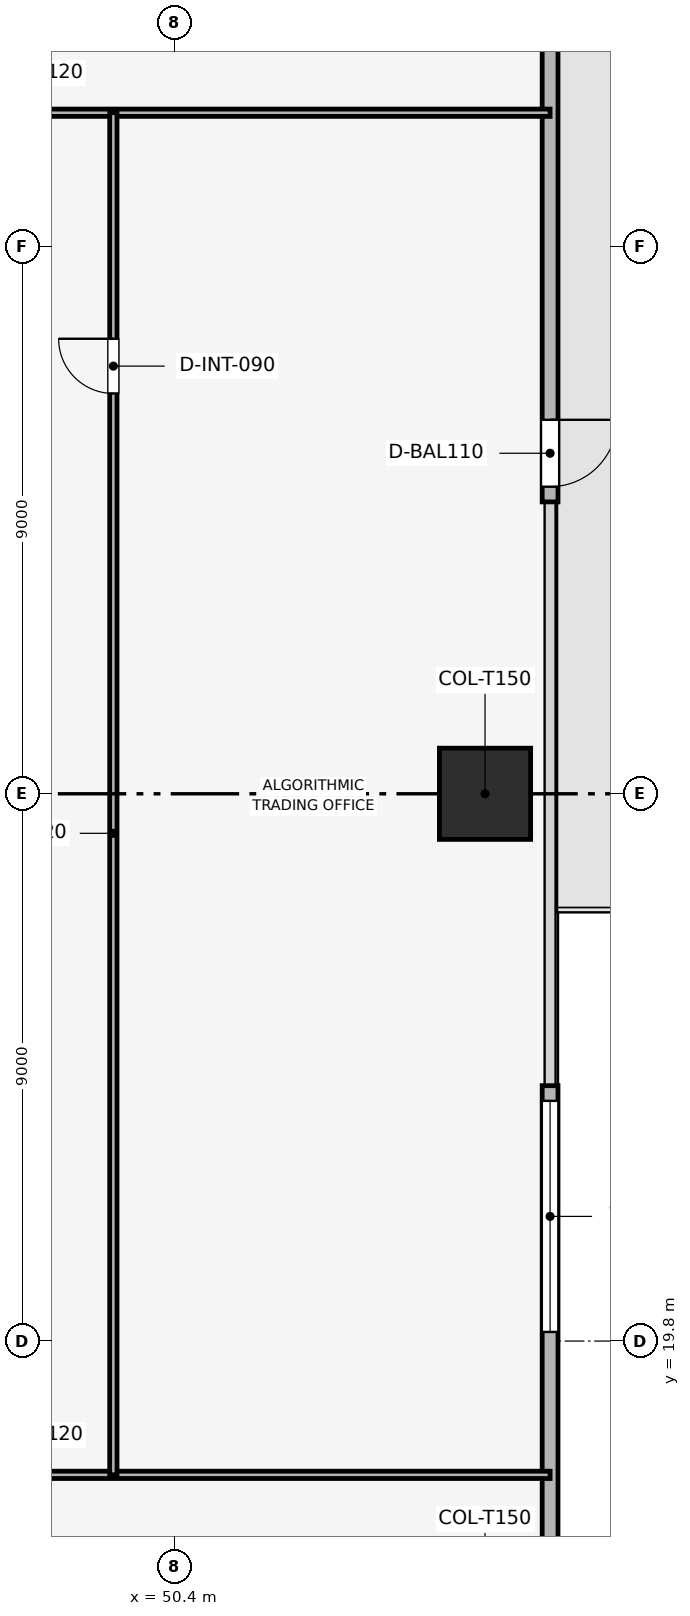
"""IFC4 building model, lengths in metres.
Left out: names, types, materials, properties, quantities, classifications, styles, units other than length and angle.
Written with IfcOpenShell. Run it as: python <this file> out.ifc"""

import sys

from ifc_helpers import new_model, si_unit, direction, frame, frame_2d, origin, origin_2d, place, context, subcontext, project, spatial, rectangle, extrude, element, fill, save


model = new_model("IFC4")
c1 = context("Model", 3, precision=1e-05, world=origin(), true_north=direction((0.0, 1.0)))
c2 = subcontext(c1, "Body", "Model", "MODEL_VIEW")
j1 = project(units=[si_unit("LENGTHUNIT", "METRE"), si_unit("PLANEANGLEUNIT", "RADIAN")], contexts=[c1])
p1 = place(None, origin())
s1 = spatial("IfcSite", under=j1, at=p1, CompositionType="ELEMENT")
p2 = place(p1, origin())
s2 = spatial("IfcBuilding", under=s1, at=p2, CompositionType="ELEMENT")
p3 = place(p2, frame((0.0, 0.0, 80.7)))
s3 = spatial("IfcBuildingStorey", under=s2, at=p3, CompositionType="ELEMENT", Elevation=80.7)
p4 = place(p3, frame((55.5, 28.8, 0.003), z_axis=(0.0, 0.0, 1.0), x_axis=(1.0, 0.0, 0.0)))
e1 = element("IfcColumn", 1, at=p4, inside=s3, PredefinedType="COLUMN", context=c2, shape_type="SweptSolid", body=[
    extrude(rectangle(XDim=1.5, YDim=1.5, at=origin_2d()), origin(), (0.0, 0.0, 1.0), 3.644),
])
p5 = place(p3, frame((56.57, 48.9, 0.0), z_axis=(0.0, 0.0, 1.0), x_axis=(0.0, -1.0, 0.0)))
e2 = element("IfcWall", 2, at=p5, inside=s3, PredefinedType="SOLIDWALL", context=c2, shape_type="SweptSolid", body=[
    extrude(rectangle(XDim=15.3, YDim=0.26, at=frame_2d((7.65, 0.0))), origin(), (0.0, 0.0, 1.0), 3.65),
])
p6 = place(p5, frame((13.95, 0.0, 0.0)))
e3 = element("IfcOpeningElement", 3, at=p6, cuts=e2, PredefinedType="OPENING", context=c2, shape_type="SweptSolid", body=[
    extrude(rectangle(XDim=1.1, YDim=2.2, at=frame_2d((0.55, 1.1))), frame((0.0, 0.14, 0.0), z_axis=(0.0, -1.0, 0.0), x_axis=(1.0, 0.0, 0.0)), (0.0, 0.0, 1.0), 0.28),
])
p7 = place(p3, frame((56.57, 24.0, 0.0), z_axis=(0.0, 0.0, 1.0), x_axis=(0.0, -1.0, 0.0)))
e4 = element("IfcWall", 4, at=p7, inside=s3, PredefinedType="SOLIDWALL", context=c2, shape_type="SweptSolid", body=[
    extrude(rectangle(XDim=15.3, YDim=0.26, at=frame_2d((7.65, 0.0))), origin(), (0.0, 0.0, 1.0), 3.65),
])
p8 = place(p7, frame((0.25, 0.0, 0.9)))
e5 = element("IfcOpeningElement", 5, at=p8, cuts=e4, PredefinedType="OPENING", context=c2, shape_type="SweptSolid", body=[
    extrude(rectangle(XDim=3.8, YDim=1.9, at=frame_2d((1.9, 0.95))), frame((0.0, 0.14, 0.0), z_axis=(0.0, -1.0, 0.0), x_axis=(1.0, 0.0, 0.0)), (0.0, 0.0, 1.0), 0.28),
])
for number, where, z_axis, x_axis in (
    (6, (40.0, 17.6, 0.0), (0.0, 0.0, 1.0), (1.0, 0.0, 0.0)),
    (7, (40.0, 40.0, 0.0), (0.0, 0.0, 1.0), (1.0, 0.0, 0.0)),
):
    element("IfcWall", number, at=place(p3, frame(where, z_axis=z_axis, x_axis=x_axis)), inside=s3, PredefinedType="PARTITIONING", context=c2, shape_type="SweptSolid", body=[
        extrude(rectangle(XDim=16.57, YDim=0.12, at=frame_2d((8.285, 0.0))), origin(), (0.0, 0.0, 1.0), 2.935),
    ])
p9 = place(p3, frame((49.388, 17.6, 0.0), z_axis=(0.0, 0.0, 1.0), x_axis=(0.0, 1.0, 0.0)))
e8 = element("IfcWall", 8, at=p9, inside=s3, PredefinedType="PARTITIONING", context=c2, shape_type="SweptSolid", body=[
    extrude(rectangle(XDim=22.4, YDim=0.12, at=frame_2d((11.2, 0.0))), origin(), (0.0, 0.0, 1.0), 3.085),
])
p10 = place(p9, frame((17.783, 0.0, 0.0)))
e9 = element("IfcOpeningElement", 9, at=p10, cuts=e8, PredefinedType="OPENING", context=c2, shape_type="SweptSolid", body=[
    extrude(rectangle(XDim=0.9, YDim=2.1, at=frame_2d((0.45, 1.05))), frame((0.0, 0.07, 0.0), z_axis=(0.0, -1.0, 0.0), x_axis=(1.0, 0.0, 0.0)), (0.0, 0.0, 1.0), 0.14),
])
p11 = place(p6, origin())
e10 = element("IfcDoor", 10, at=p11, inside=s3, OperationType="SINGLE_SWING_LEFT", PredefinedType="DOOR", context=c2, shape_type="SweptSolid", body=[
    extrude(rectangle(XDim=1.1, YDim=2.2, at=frame_2d((0.55, 1.1))), frame((0.0, 0.025, 0.0), z_axis=(0.0, -1.0, 0.0), x_axis=(1.0, 0.0, 0.0)), (0.0, 0.0, 1.0), 0.05),
])
fill(e3, e10)
p12 = place(p8, origin())
e11 = element("IfcWindow", 11, at=p12, inside=s3, PartitioningType="SINGLE_PANEL", PredefinedType="WINDOW", context=c2, shape_type="SweptSolid", body=[
    extrude(rectangle(XDim=3.8, YDim=1.9, at=frame_2d((1.9, 0.95))), frame((0.0, 0.03, 0.0), z_axis=(0.0, -1.0, 0.0), x_axis=(1.0, 0.0, 0.0)), (0.0, 0.0, 1.0), 0.06),
])
fill(e5, e11)
p13 = place(p10, origin())
e12 = element("IfcDoor", 12, at=p13, inside=s3, OperationType="SINGLE_SWING_RIGHT", PredefinedType="DOOR", context=c2, shape_type="SweptSolid", body=[
    extrude(rectangle(XDim=0.9, YDim=2.1, at=frame_2d((0.45, 1.05))), frame((0.0, 0.025, 0.0), z_axis=(0.0, -1.0, 0.0), x_axis=(1.0, 0.0, 0.0)), (0.0, 0.0, 1.0), 0.05),
])
fill(e9, e12)
save(model, sys.argv[1])
